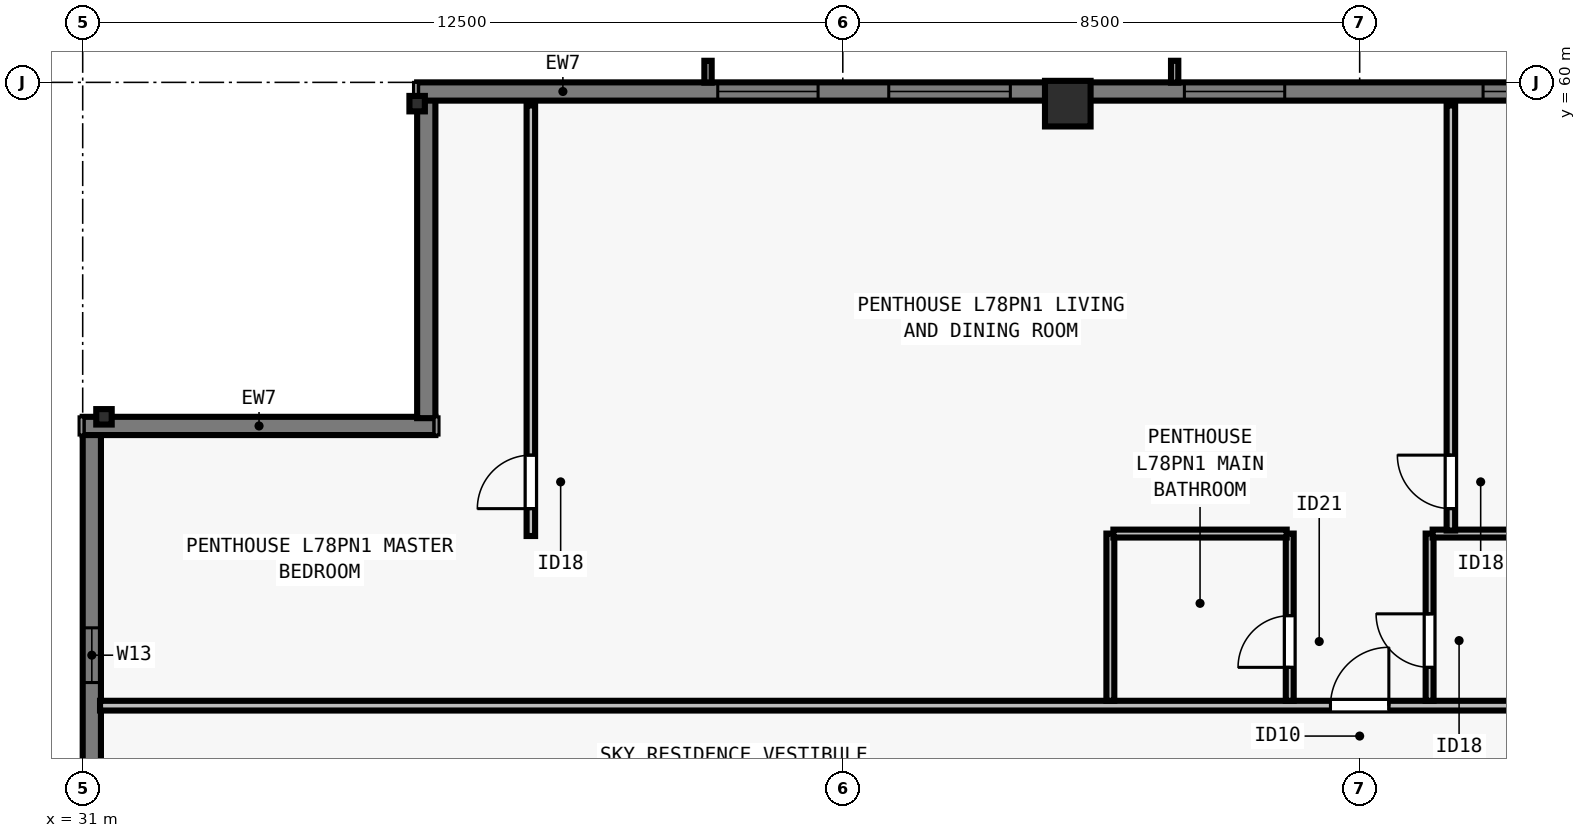
"""IFC4 building model, lengths in metres.
Left out: names, types, materials, properties, quantities, classifications, styles, units other than length and angle.
Written with IfcOpenShell. Run it as: python <this file> out.ifc"""

import sys

from ifc_helpers import new_model, si_unit, direction, frame, frame_2d, origin, origin_2d, place, context, subcontext, project, spatial, rectangle, i_section, extrude, element, fill, save


model = new_model("IFC4")
c1 = context("Model", 3, precision=1e-05, world=origin(), true_north=direction((0.0, 1.0)))
c2 = subcontext(c1, "Body", "Model", "MODEL_VIEW")
j1 = project(units=[si_unit("LENGTHUNIT", "METRE"), si_unit("PLANEANGLEUNIT", "RADIAN")], contexts=[c1])
p1 = place(None, origin())
s1 = spatial("IfcSite", under=j1, at=p1, CompositionType="ELEMENT")
p2 = place(p1, origin())
s2 = spatial("IfcBuilding", under=s1, at=p2, CompositionType="ELEMENT")
p3 = place(p2, frame((0.0, 0.0, 284.0)))
s3 = spatial("IfcBuildingStorey", under=s2, at=p3, CompositionType="ELEMENT", Elevation=284.0)
p4 = place(p3, frame((47.2, 59.65, 0.0), z_axis=(0.0, 0.0, 1.0), x_axis=(1.0, 0.0, 0.0)))
e1 = element("IfcColumn", 1, at=p4, inside=s3, PredefinedType="COLUMN", context=c2, shape_type="SweptSolid", body=[
    extrude(rectangle(XDim=0.75, YDim=0.75, at=origin_2d()), origin(), (0.0, 0.0, 1.0), 3.5),
])
for number, where, z_axis, x_axis in (
    (2, (36.5, 59.65, 0.0), (0.0, 0.0, 1.0), (1.0, 0.0, 0.0)),
    (3, (31.35, 54.5, 0.0), (0.0, 0.0, 1.0), (0.0, 1.0, 0.0)),
):
    element("IfcColumn", number, at=place(p3, frame(where, z_axis=z_axis, x_axis=x_axis)), inside=s3, PredefinedType="COLUMN", context=c2, shape_type="SweptSolid", body=[
        extrude(i_section(OverallWidth=0.254, OverallDepth=0.254, WebThickness=0.009, FlangeThickness=0.014, FilletRadius=0.013, at=origin_2d()), origin(), (0.0, 0.0, 1.0), 3.5),
    ])
p5 = place(p3, frame((31.15, 23.5, 0.0), z_axis=(0.0, 0.0, 1.0), x_axis=(0.0, 1.0, 0.0)))
e4 = element("IfcWall", 4, at=p5, inside=s3, PredefinedType="SOLIDWALL", context=c2, shape_type="SweptSolid", body=[
    extrude(rectangle(XDim=30.722, YDim=0.3, at=frame_2d((15.361, 0.0))), origin(), (0.0, 0.0, 1.0), 3.29),
])
p6 = place(p5, frame((7.756, 0.0, 0.8)))
e5 = element("IfcOpeningElement", 5, at=p6, cuts=e4, PredefinedType="OPENING", context=c2, shape_type="SweptSolid", body=[
    extrude(rectangle(XDim=2.0, YDim=1.758, at=frame_2d((1.0, 0.879))), frame((0.0, 0.16, 0.0), z_axis=(0.0, -1.0, 0.0), x_axis=(1.0, 0.0, 0.0)), (0.0, 0.0, 1.0), 0.32),
])
p7 = place(p5, frame((12.617, 0.0, 0.8)))
e6 = element("IfcOpeningElement", 6, at=p7, cuts=e4, PredefinedType="OPENING", context=c2, shape_type="SweptSolid", body=[
    extrude(rectangle(XDim=1.65, YDim=1.758, at=frame_2d((0.825, 0.879))), frame((0.0, 0.16, 0.0), z_axis=(0.0, -1.0, 0.0), x_axis=(1.0, 0.0, 0.0)), (0.0, 0.0, 1.0), 0.32),
])
p8 = place(p5, frame((17.53, 0.0, 0.8)))
e7 = element("IfcOpeningElement", 7, at=p8, cuts=e4, PredefinedType="OPENING", context=c2, shape_type="SweptSolid", body=[
    extrude(rectangle(XDim=2.0, YDim=1.758, at=frame_2d((1.0, 0.879))), frame((0.0, 0.16, 0.0), z_axis=(0.0, -1.0, 0.0), x_axis=(1.0, 0.0, 0.0)), (0.0, 0.0, 1.0), 0.32),
])
p9 = place(p5, frame((21.142, 0.0, 0.8)))
e8 = element("IfcOpeningElement", 8, at=p9, cuts=e4, PredefinedType="OPENING", context=c2, shape_type="SweptSolid", body=[
    extrude(rectangle(XDim=1.65, YDim=1.758, at=frame_2d((0.825, 0.879))), frame((0.0, 0.16, 0.0), z_axis=(0.0, -1.0, 0.0), x_axis=(1.0, 0.0, 0.0)), (0.0, 0.0, 1.0), 0.32),
])
p10 = place(p5, frame((26.63, 0.0, 0.8)))
e9 = element("IfcOpeningElement", 9, at=p10, cuts=e4, PredefinedType="OPENING", context=c2, shape_type="SweptSolid", body=[
    extrude(rectangle(XDim=0.9, YDim=1.75, at=frame_2d((0.45, 0.875))), frame((0.0, 0.16, 0.0), z_axis=(0.0, -1.0, 0.0), x_axis=(1.0, 0.0, 0.0)), (0.0, 0.0, 1.0), 0.32),
])
p11 = place(p3, frame((31.0, 54.35, 0.0), z_axis=(0.0, 0.0, 1.0), x_axis=(1.0, 0.0, 0.0)))
e10 = element("IfcWall", 10, at=p11, inside=s3, PredefinedType="SOLIDWALL", context=c2, shape_type="SweptSolid", body=[
    extrude(rectangle(XDim=5.8, YDim=0.3, at=frame_2d((2.9, 0.0))), origin(), (0.0, 0.0, 1.0), 3.29),
])
p12 = place(p3, frame((36.65, 54.478, 0.0), z_axis=(0.0, 0.0, 1.0), x_axis=(0.0, 1.0, 0.0)))
e11 = element("IfcWall", 11, at=p12, inside=s3, PredefinedType="SOLIDWALL", context=c2, shape_type="SweptSolid", body=[
    extrude(rectangle(XDim=5.244, YDim=0.3, at=frame_2d((2.622, 0.0))), origin(), (0.0, 0.0, 1.0), 3.29),
])
p13 = place(p3, frame((36.5, 59.85, 0.0), z_axis=(0.0, 0.0, 1.0), x_axis=(1.0, 0.0, 0.0)))
e12 = element("IfcWall", 12, at=p13, inside=s3, PredefinedType="SOLIDWALL", context=c2, shape_type="SweptSolid", body=[
    extrude(rectangle(XDim=30.722, YDim=0.3, at=frame_2d((15.361, 0.0))), origin(), (0.0, 0.0, 1.0), 3.29),
])
p14 = place(p13, frame((4.944, 0.0, 0.8)))
e13 = element("IfcOpeningElement", 13, at=p14, cuts=e12, PredefinedType="OPENING", context=c2, shape_type="SweptSolid", body=[
    extrude(rectangle(XDim=1.65, YDim=1.758, at=frame_2d((0.825, 0.879))), frame((0.0, 0.16, 0.0), z_axis=(0.0, -1.0, 0.0), x_axis=(1.0, 0.0, 0.0)), (0.0, 0.0, 1.0), 0.32),
])
p15 = place(p13, frame((7.756, 0.0, 0.8)))
e14 = element("IfcOpeningElement", 14, at=p15, cuts=e12, PredefinedType="OPENING", context=c2, shape_type="SweptSolid", body=[
    extrude(rectangle(XDim=2.0, YDim=1.758, at=frame_2d((1.0, 0.879))), frame((0.0, 0.16, 0.0), z_axis=(0.0, -1.0, 0.0), x_axis=(1.0, 0.0, 0.0)), (0.0, 0.0, 1.0), 0.32),
])
p16 = place(p13, frame((12.617, 0.0, 0.8)))
e15 = element("IfcOpeningElement", 15, at=p16, cuts=e12, PredefinedType="OPENING", context=c2, shape_type="SweptSolid", body=[
    extrude(rectangle(XDim=1.65, YDim=1.758, at=frame_2d((0.825, 0.879))), frame((0.0, 0.16, 0.0), z_axis=(0.0, -1.0, 0.0), x_axis=(1.0, 0.0, 0.0)), (0.0, 0.0, 1.0), 0.32),
])
p17 = place(p13, frame((17.53, 0.0, 0.8)))
e16 = element("IfcOpeningElement", 16, at=p17, cuts=e12, PredefinedType="OPENING", context=c2, shape_type="SweptSolid", body=[
    extrude(rectangle(XDim=2.0, YDim=1.758, at=frame_2d((1.0, 0.879))), frame((0.0, 0.16, 0.0), z_axis=(0.0, -1.0, 0.0), x_axis=(1.0, 0.0, 0.0)), (0.0, 0.0, 1.0), 0.32),
])
p18 = place(p13, frame((21.142, 0.0, 0.8)))
e17 = element("IfcOpeningElement", 17, at=p18, cuts=e12, PredefinedType="OPENING", context=c2, shape_type="SweptSolid", body=[
    extrude(rectangle(XDim=1.65, YDim=1.758, at=frame_2d((0.825, 0.879))), frame((0.0, 0.16, 0.0), z_axis=(0.0, -1.0, 0.0), x_axis=(1.0, 0.0, 0.0)), (0.0, 0.0, 1.0), 0.32),
])
p19 = place(p13, frame((23.954, 0.0, 0.8)))
e18 = element("IfcOpeningElement", 18, at=p19, cuts=e12, PredefinedType="OPENING", context=c2, shape_type="SweptSolid", body=[
    extrude(rectangle(XDim=2.0, YDim=1.758, at=frame_2d((1.0, 0.879))), frame((0.0, 0.16, 0.0), z_axis=(0.0, -1.0, 0.0), x_axis=(1.0, 0.0, 0.0)), (0.0, 0.0, 1.0), 0.32),
])
p20 = place(p3, frame((31.285, 49.75, 0.0), z_axis=(0.0, 0.0, 1.0), x_axis=(1.0, 0.0, 0.0)))
e19 = element("IfcWall", 19, at=p20, inside=s3, PredefinedType="PARTITIONING", context=c2, shape_type="SweptSolid", body=[
    extrude(rectangle(XDim=41.43, YDim=0.16, at=frame_2d((20.715, 0.0))), origin(), (0.0, 0.0, 1.0), 3.009),
])
p21 = place(p20, frame((20.235, 0.0, 0.0)))
e20 = element("IfcOpeningElement", 20, at=p21, cuts=e19, PredefinedType="OPENING", context=c2, shape_type="SweptSolid", body=[
    extrude(rectangle(XDim=0.96, YDim=2.18, at=frame_2d((0.48, 1.09))), frame((0.0, 0.09, 0.0), z_axis=(0.0, -1.0, 0.0), x_axis=(1.0, 0.0, 0.0)), (0.0, 0.0, 1.0), 0.18),
])
p22 = place(p3, frame((47.9, 49.83, 0.0), z_axis=(0.0, 0.0, 1.0), x_axis=(0.0, 1.0, 0.0)))
e21 = element("IfcWall", 21, at=p22, inside=s3, PredefinedType="PLUMBINGWALL", context=c2, shape_type="SweptSolid", body=[
    extrude(rectangle(XDim=2.75, YDim=0.13, at=frame_2d((1.375, 0.0))), origin(), (0.0, 0.0, 1.0), 3.29),
])
p23 = place(p3, frame((50.85, 49.83, 0.0), z_axis=(0.0, 0.0, 1.0), x_axis=(0.0, 1.0, 0.0)))
e22 = element("IfcWall", 22, at=p23, inside=s3, PredefinedType="PLUMBINGWALL", context=c2, shape_type="SweptSolid", body=[
    extrude(rectangle(XDim=2.75, YDim=0.13, at=frame_2d((1.375, 0.0))), origin(), (0.0, 0.0, 1.0), 3.009),
])
p24 = place(p23, frame((0.55, 0.0, 0.0)))
e23 = element("IfcOpeningElement", 23, at=p24, cuts=e22, PredefinedType="OPENING", context=c2, shape_type="SweptSolid", body=[
    extrude(rectangle(XDim=0.85, YDim=2.08, at=frame_2d((0.425, 1.04))), frame((0.0, 0.075, 0.0), z_axis=(0.0, -1.0, 0.0), x_axis=(1.0, 0.0, 0.0)), (0.0, 0.0, 1.0), 0.15),
])
p25 = place(p3, frame((47.95, 52.58, 0.0), z_axis=(0.0, 0.0, 1.0), x_axis=(1.0, 0.0, 0.0)))
e24 = element("IfcWall", 24, at=p25, inside=s3, PredefinedType="PLUMBINGWALL", context=c2, shape_type="SweptSolid", body=[
    extrude(rectangle(XDim=2.85, YDim=0.13, at=frame_2d((1.425, 0.0))), origin(), (0.0, 0.0, 1.0), 3.29),
])
p26 = place(p3, frame((53.15, 49.83, 0.0), z_axis=(0.0, 0.0, 1.0), x_axis=(0.0, 1.0, 0.0)))
e25 = element("IfcWall", 25, at=p26, inside=s3, PredefinedType="PLUMBINGWALL", context=c2, shape_type="SweptSolid", body=[
    extrude(rectangle(XDim=2.75, YDim=0.13, at=frame_2d((1.375, 0.0))), origin(), (0.0, 0.0, 1.0), 3.29),
])
p27 = place(p26, frame((0.55, 0.0, 0.0)))
e26 = element("IfcOpeningElement", 26, at=p27, cuts=e25, PredefinedType="OPENING", context=c2, shape_type="SweptSolid", body=[
    extrude(rectangle(XDim=0.88, YDim=2.1, at=frame_2d((0.44, 1.05))), frame((0.0, 0.075, 0.0), z_axis=(0.0, -1.0, 0.0), x_axis=(1.0, 0.0, 0.0)), (0.0, 0.0, 1.0), 0.15),
])
p28 = place(p3, frame((53.2, 52.58, 0.0), z_axis=(0.0, 0.0, 1.0), x_axis=(1.0, 0.0, 0.0)))
e27 = element("IfcWall", 27, at=p28, inside=s3, PredefinedType="PLUMBINGWALL", context=c2, shape_type="SweptSolid", body=[
    extrude(rectangle(XDim=3.15, YDim=0.13, at=frame_2d((1.575, 0.0))), origin(), (0.0, 0.0, 1.0), 3.29),
])
p29 = place(p3, frame((38.37, 52.54, 0.0), z_axis=(0.0, 0.0, 1.0), x_axis=(0.0, 1.0, 0.0)))
e28 = element("IfcWall", 28, at=p29, inside=s3, PredefinedType="PARTITIONING", context=c2, shape_type="SweptSolid", body=[
    extrude(rectangle(XDim=7.08, YDim=0.14, at=frame_2d((3.54, 0.0))), origin(), (0.0, 0.0, 1.0), 2.653),
])
p30 = place(p29, frame((0.45, 0.0, 0.0)))
e29 = element("IfcOpeningElement", 29, at=p30, cuts=e28, PredefinedType="OPENING", context=c2, shape_type="SweptSolid", body=[
    extrude(rectangle(XDim=0.88, YDim=2.1, at=frame_2d((0.44, 1.05))), frame((0.0, 0.08, 0.0), z_axis=(0.0, -1.0, 0.0), x_axis=(1.0, 0.0, 0.0)), (0.0, 0.0, 1.0), 0.16),
])
p31 = place(p3, frame((53.5, 52.63, 0.0), z_axis=(0.0, 0.0, 1.0), x_axis=(0.0, 1.0, 0.0)))
e30 = element("IfcWall", 30, at=p31, inside=s3, PredefinedType="PARTITIONING", context=c2, shape_type="SweptSolid", body=[
    extrude(rectangle(XDim=6.99, YDim=0.14, at=frame_2d((3.495, 0.0))), origin(), (0.0, 0.0, 1.0), 3.009),
])
p32 = place(p31, frame((0.36, 0.0, 0.0)))
e31 = element("IfcOpeningElement", 31, at=p32, cuts=e30, PredefinedType="OPENING", context=c2, shape_type="SweptSolid", body=[
    extrude(rectangle(XDim=0.88, YDim=2.1, at=frame_2d((0.44, 1.05))), frame((0.0, 0.08, 0.0), z_axis=(0.0, -1.0, 0.0), x_axis=(1.0, 0.0, 0.0)), (0.0, 0.0, 1.0), 0.16),
])
p33 = place(p14, origin())
e32 = element("IfcWindow", 32, at=p33, inside=s3, PartitioningType="SINGLE_PANEL", PredefinedType="WINDOW", context=c2, shape_type="SweptSolid", body=[
    extrude(rectangle(XDim=1.65, YDim=1.758, at=frame_2d((0.825, 0.879))), frame((0.0, -0.05, 0.0), z_axis=(0.0, -1.0, 0.0), x_axis=(1.0, 0.0, 0.0)), (0.0, 0.0, 1.0), 0.06),
])
fill(e13, e32)
p34 = place(p15, origin())
e33 = element("IfcWindow", 33, at=p34, inside=s3, PartitioningType="SINGLE_PANEL", PredefinedType="WINDOW", context=c2, shape_type="SweptSolid", body=[
    extrude(rectangle(XDim=2.0, YDim=1.758, at=frame_2d((1.0, 0.879))), frame((0.0, -0.05, 0.0), z_axis=(0.0, -1.0, 0.0), x_axis=(1.0, 0.0, 0.0)), (0.0, 0.0, 1.0), 0.06),
])
fill(e14, e33)
p35 = place(p16, origin())
e34 = element("IfcWindow", 34, at=p35, inside=s3, PartitioningType="SINGLE_PANEL", PredefinedType="WINDOW", context=c2, shape_type="SweptSolid", body=[
    extrude(rectangle(XDim=1.65, YDim=1.758, at=frame_2d((0.825, 0.879))), frame((0.0, -0.05, 0.0), z_axis=(0.0, -1.0, 0.0), x_axis=(1.0, 0.0, 0.0)), (0.0, 0.0, 1.0), 0.06),
])
fill(e15, e34)
p36 = place(p17, origin())
e35 = element("IfcWindow", 35, at=p36, inside=s3, PartitioningType="SINGLE_PANEL", PredefinedType="WINDOW", context=c2, shape_type="SweptSolid", body=[
    extrude(rectangle(XDim=2.0, YDim=1.758, at=frame_2d((1.0, 0.879))), frame((0.0, -0.05, 0.0), z_axis=(0.0, -1.0, 0.0), x_axis=(1.0, 0.0, 0.0)), (0.0, 0.0, 1.0), 0.06),
])
fill(e16, e35)
p37 = place(p10, origin())
e36 = element("IfcWindow", 36, at=p37, inside=s3, PartitioningType="SINGLE_PANEL", PredefinedType="WINDOW", context=c2, shape_type="SweptSolid", body=[
    extrude(rectangle(XDim=0.9, YDim=1.75, at=frame_2d((0.45, 0.875))), frame((0.0, -0.04, 0.0), z_axis=(0.0, -1.0, 0.0), x_axis=(1.0, 0.0, 0.0)), (0.0, 0.0, 1.0), 0.06),
])
fill(e9, e36)
p38 = place(p24, origin())
e37 = element("IfcDoor", 37, at=p38, inside=s3, OperationType="SINGLE_SWING_LEFT", PredefinedType="DOOR", context=c2, shape_type="SweptSolid", body=[
    extrude(rectangle(XDim=0.85, YDim=2.08, at=frame_2d((0.425, 1.04))), frame((0.0, 0.025, 0.0), z_axis=(0.0, -1.0, 0.0), x_axis=(1.0, 0.0, 0.0)), (0.0, 0.0, 1.0), 0.05),
])
fill(e23, e37)
p39 = place(p27, origin())
e38 = element("IfcDoor", 38, at=p39, inside=s3, OperationType="SINGLE_SWING_RIGHT", PredefinedType="DOOR", context=c2, shape_type="SweptSolid", body=[
    extrude(rectangle(XDim=0.88, YDim=2.1, at=frame_2d((0.44, 1.05))), frame((0.0, 0.025, 0.0), z_axis=(0.0, -1.0, 0.0), x_axis=(1.0, 0.0, 0.0)), (0.0, 0.0, 1.0), 0.05),
])
fill(e26, e38)
p40 = place(p30, origin())
e39 = element("IfcDoor", 39, at=p40, inside=s3, OperationType="SINGLE_SWING_LEFT", PredefinedType="DOOR", context=c2, shape_type="SweptSolid", body=[
    extrude(rectangle(XDim=0.88, YDim=2.1, at=frame_2d((0.44, 1.05))), frame((0.0, 0.025, 0.0), z_axis=(0.0, -1.0, 0.0), x_axis=(1.0, 0.0, 0.0)), (0.0, 0.0, 1.0), 0.05),
])
fill(e29, e39)
p41 = place(p32, origin())
e40 = element("IfcDoor", 40, at=p41, inside=s3, OperationType="SINGLE_SWING_RIGHT", PredefinedType="DOOR", context=c2, shape_type="SweptSolid", body=[
    extrude(rectangle(XDim=0.88, YDim=2.1, at=frame_2d((0.44, 1.05))), frame((0.0, 0.025, 0.0), z_axis=(0.0, -1.0, 0.0), x_axis=(1.0, 0.0, 0.0)), (0.0, 0.0, 1.0), 0.05),
])
fill(e31, e40)
p42 = place(p21, origin())
e41 = element("IfcDoor", 41, at=p42, inside=s3, OperationType="SINGLE_SWING_RIGHT", PredefinedType="DOOR", context=c2, shape_type="SweptSolid", body=[
    extrude(rectangle(XDim=0.96, YDim=2.18, at=frame_2d((0.48, 1.09))), frame((0.0, 0.025, 0.0), z_axis=(0.0, -1.0, 0.0), x_axis=(1.0, 0.0, 0.0)), (0.0, 0.0, 1.0), 0.05),
])
fill(e20, e41)
save(model, sys.argv[1])
